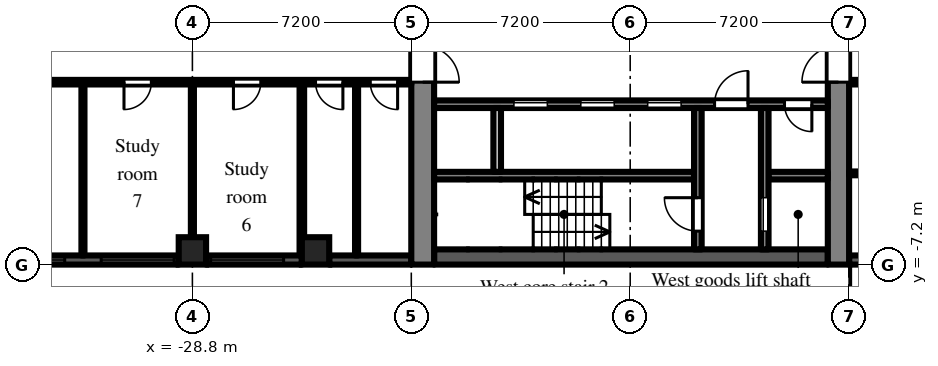
"""IFC4 building model, lengths in metres.
Left out: names, types, materials, properties, quantities, classifications, styles, units other than length and angle.
Written with IfcOpenShell. Run it as: python <this file> out.ifc"""

import sys

from ifc_helpers import new_model, si_unit, direction, frame, frame_2d, origin, origin_2d, place, context, subcontext, project, spatial, rectangle, extrude, element, fill, save


model = new_model("IFC4")
c1 = context("Model", 3, precision=1e-05, world=origin(), true_north=direction((0.0, 1.0)))
c2 = subcontext(c1, "Body", "Model", "MODEL_VIEW")
j1 = project(units=[si_unit("LENGTHUNIT", "METRE"), si_unit("PLANEANGLEUNIT", "RADIAN")], contexts=[c1])
p1 = place(None, origin())
s1 = spatial("IfcSite", under=j1, at=p1, CompositionType="ELEMENT")
p2 = place(p1, origin())
s2 = spatial("IfcBuilding", under=s1, at=p2, CompositionType="ELEMENT")
p3 = place(p2, frame((0.0, 0.0, 20.7)))
s3 = spatial("IfcBuildingStorey", under=s2, at=p3, CompositionType="ELEMENT", Elevation=20.7)
for number, where, z_axis, x_axis in (
    (1, (-28.8, -6.75, 0.0), (0.0, 0.0, 1.0), (1.0, 0.0, 0.0)),
    (2, (-24.75, -6.75, 0.0), (0.0, 0.0, 1.0), (1.0, 0.0, 0.0)),
):
    element("IfcColumn", number, at=place(p3, frame(where, z_axis=z_axis, x_axis=x_axis)), inside=s3, PredefinedType="COLUMN", context=c2, shape_type="SweptSolid", body=[
        extrude(rectangle(XDim=0.9, YDim=0.9, at=origin_2d()), origin(), (0.0, 0.0, 1.0), 3.0),
    ])
p4 = place(p3, frame((-35.55, -7.05, 0.0), z_axis=(0.0, 0.0, 1.0), x_axis=(1.0, 0.0, 0.0)))
e3 = element("IfcWall", 3, at=p4, inside=s3, PredefinedType="SOLIDWALL", context=c2, shape_type="SweptSolid", body=[
    extrude(rectangle(XDim=6.3, YDim=0.3, at=frame_2d((3.15, 0.0))), origin(), (0.0, 0.0, 1.0), 2.1),
])
p5 = place(p4, frame((0.15, 0.0, 0.2)))
e4 = element("IfcOpeningElement", 4, at=p5, cuts=e3, PredefinedType="OPENING", context=c2, shape_type="SweptSolid", body=[
    extrude(rectangle(XDim=2.4, YDim=1.85, at=frame_2d((1.2, 0.925))), frame((0.0, 0.16, 0.0), z_axis=(0.0, -1.0, 0.0), x_axis=(1.0, 0.0, 0.0)), (0.0, 0.0, 1.0), 0.32),
])
p6 = place(p4, frame((3.75, 0.0, 0.2)))
e5 = element("IfcOpeningElement", 5, at=p6, cuts=e3, PredefinedType="OPENING", context=c2, shape_type="SweptSolid", body=[
    extrude(rectangle(XDim=2.4, YDim=1.85, at=frame_2d((1.2, 0.925))), frame((0.0, 0.16, 0.0), z_axis=(0.0, -1.0, 0.0), x_axis=(1.0, 0.0, 0.0)), (0.0, 0.0, 1.0), 0.32),
])
p7 = place(p3, frame((-28.35, -7.05, 0.0), z_axis=(0.0, 0.0, 1.0), x_axis=(1.0, 0.0, 0.0)))
e6 = element("IfcWall", 6, at=p7, inside=s3, PredefinedType="SOLIDWALL", context=c2, shape_type="SweptSolid", body=[
    extrude(rectangle(XDim=3.15, YDim=0.3, at=frame_2d((1.575, 0.0))), origin(), (0.0, 0.0, 1.0), 2.1),
])
p8 = place(p7, frame((0.15, 0.0, 0.2)))
e7 = element("IfcOpeningElement", 7, at=p8, cuts=e6, PredefinedType="OPENING", context=c2, shape_type="SweptSolid", body=[
    extrude(rectangle(XDim=2.4, YDim=1.85, at=frame_2d((1.2, 0.925))), frame((0.0, 0.16, 0.0), z_axis=(0.0, -1.0, 0.0), x_axis=(1.0, 0.0, 0.0)), (0.0, 0.0, 1.0), 0.32),
])
p9 = place(p3, frame((-24.3, -7.05, 0.0), z_axis=(0.0, 0.0, 1.0), x_axis=(1.0, 0.0, 0.0)))
e8 = element("IfcWall", 8, at=p9, inside=s3, PredefinedType="SOLIDWALL", context=c2, shape_type="SweptSolid", body=[
    extrude(rectangle(XDim=2.7, YDim=0.3, at=frame_2d((1.35, 0.0))), origin(), (0.0, 0.0, 1.0), 2.1),
])
p10 = place(p3, frame((-7.2, -7.05, 0.0), z_axis=(0.0, 0.0, 1.0), x_axis=(1.0, 0.0, 0.0)))
e9 = element("IfcWall", 9, at=p10, inside=s3, PredefinedType="SOLIDWALL", context=c2, shape_type="SweptSolid", body=[
    extrude(rectangle(XDim=3.0, YDim=0.3, at=frame_2d((1.5, 0.0))), origin(), (0.0, 0.0, 1.0), 2.1),
])
p11 = place(p3, frame((-7.55, -7.2, 0.0), z_axis=(0.0, 0.0, 1.0), x_axis=(0.0, 1.0, 0.0)))
e10 = element("IfcWall", 10, at=p11, inside=s3, PredefinedType="SHEAR", context=c2, shape_type="SweptSolid", body=[
    extrude(rectangle(XDim=14.4, YDim=0.7, at=frame_2d((7.2, 0.0))), origin(), (0.0, 0.0, 1.0), 2.575),
])
p12 = place(p11, frame((6.0, 0.0, 0.0)))
e11 = element("IfcOpeningElement", 11, at=p12, cuts=e10, PredefinedType="OPENING", context=c2, shape_type="SweptSolid", body=[
    extrude(rectangle(XDim=2.4, YDim=2.2, at=frame_2d((1.2, 1.1))), frame((0.0, 0.36, 0.0), z_axis=(0.0, -1.0, 0.0), x_axis=(1.0, 0.0, 0.0)), (0.0, 0.0, 1.0), 0.72),
])
p13 = place(p3, frame((-21.225, -7.2, 0.0), z_axis=(0.0, 0.0, 1.0), x_axis=(0.0, 1.0, 0.0)))
e12 = element("IfcWall", 12, at=p13, inside=s3, PredefinedType="SHEAR", context=c2, shape_type="SweptSolid", body=[
    extrude(rectangle(XDim=14.4, YDim=0.75, at=frame_2d((7.2, 0.0))), origin(), (0.0, 0.0, 1.0), 2.575),
])
p14 = place(p13, frame((6.0, 0.0, 0.0)))
e13 = element("IfcOpeningElement", 13, at=p14, cuts=e12, PredefinedType="OPENING", context=c2, shape_type="SweptSolid", body=[
    extrude(rectangle(XDim=2.4, YDim=2.2, at=frame_2d((1.2, 1.1))), frame((0.0, 0.385, 0.0), z_axis=(0.0, -1.0, 0.0), x_axis=(1.0, 0.0, 0.0)), (0.0, 0.0, 1.0), 0.77),
])
p15 = place(p3, frame((-7.9, -6.95, 0.0), z_axis=(0.0, 0.0, 1.0), x_axis=(-1.0, 0.0, 0.0)))
e14 = element("IfcWall", 14, at=p15, inside=s3, PredefinedType="SHEAR", context=c2, shape_type="SweptSolid", body=[
    extrude(rectangle(XDim=12.95, YDim=0.5, at=frame_2d((6.475, 0.0))), origin(), (0.0, 0.0, 1.0), 2.575),
])
p16 = place(p3, frame((-7.9, -1.925, 0.0), z_axis=(0.0, 0.0, 1.0), x_axis=(-1.0, 0.0, 0.0)))
e15 = element("IfcWall", 15, at=p16, inside=s3, PredefinedType="SHEAR", context=c2, shape_type="SweptSolid", body=[
    extrude(rectangle(XDim=12.95, YDim=0.25, at=frame_2d((6.475, 0.0))), origin(), (0.0, 0.0, 1.0), 2.575),
])
p17 = place(p16, frame((4.825, 0.0, 0.0)))
e16 = element("IfcOpeningElement", 16, at=p17, cuts=e15, PredefinedType="OPENING", context=c2, shape_type="SweptSolid", body=[
    extrude(rectangle(XDim=1.1, YDim=2.1, at=frame_2d((0.55, 1.05))), frame((0.0, 0.135, 0.0), z_axis=(0.0, -1.0, 0.0), x_axis=(1.0, 0.0, 0.0)), (0.0, 0.0, 1.0), 0.27),
])
p18 = place(p16, frame((7.025, 0.0, 0.0)))
e17 = element("IfcOpeningElement", 17, at=p18, cuts=e15, PredefinedType="OPENING", context=c2, shape_type="SweptSolid", body=[
    extrude(rectangle(XDim=1.1, YDim=2.1, at=frame_2d((0.55, 1.05))), frame((0.0, 0.135, 0.0), z_axis=(0.0, -1.0, 0.0), x_axis=(1.0, 0.0, 0.0)), (0.0, 0.0, 1.0), 0.27),
])
p19 = place(p16, frame((9.225, 0.0, 0.0)))
e18 = element("IfcOpeningElement", 18, at=p19, cuts=e15, PredefinedType="OPENING", context=c2, shape_type="SweptSolid", body=[
    extrude(rectangle(XDim=1.1, YDim=2.1, at=frame_2d((0.55, 1.05))), frame((0.0, 0.135, 0.0), z_axis=(0.0, -1.0, 0.0), x_axis=(1.0, 0.0, 0.0)), (0.0, 0.0, 1.0), 0.27),
])
p20 = place(p16, frame((0.525, 0.0, 0.0)))
e19 = element("IfcOpeningElement", 19, at=p20, cuts=e15, PredefinedType="OPENING", context=c2, shape_type="SweptSolid", body=[
    extrude(rectangle(XDim=0.9, YDim=2.1, at=frame_2d((0.45, 1.05))), frame((0.0, 0.135, 0.0), z_axis=(0.0, -1.0, 0.0), x_axis=(1.0, 0.0, 0.0)), (0.0, 0.0, 1.0), 0.27),
])
p21 = place(p16, frame((2.625, 0.0, 0.0)))
e20 = element("IfcOpeningElement", 20, at=p21, cuts=e15, PredefinedType="OPENING", context=c2, shape_type="SweptSolid", body=[
    extrude(rectangle(XDim=1.1, YDim=2.1, at=frame_2d((0.55, 1.05))), frame((0.0, 0.135, 0.0), z_axis=(0.0, -1.0, 0.0), x_axis=(1.0, 0.0, 0.0)), (0.0, 0.0, 1.0), 0.27),
])
p22 = place(p3, frame((-7.9, -4.275, 0.0), z_axis=(0.0, 0.0, 1.0), x_axis=(-1.0, 0.0, 0.0)))
e21 = element("IfcWall", 21, at=p22, inside=s3, PredefinedType="SHEAR", context=c2, shape_type="SweptSolid", body=[
    extrude(rectangle(XDim=1.95, YDim=0.25, at=frame_2d((0.975, 0.0))), origin(), (0.0, 0.0, 1.0), 2.575),
])
p23 = place(p3, frame((-12.3, -4.275, 0.0), z_axis=(0.0, 0.0, 1.0), x_axis=(-1.0, 0.0, 0.0)))
e22 = element("IfcWall", 22, at=p23, inside=s3, PredefinedType="SHEAR", context=c2, shape_type="SweptSolid", body=[
    extrude(rectangle(XDim=8.55, YDim=0.25, at=frame_2d((4.275, 0.0))), origin(), (0.0, 0.0, 1.0), 2.575),
])
p24 = place(p3, frame((-9.975, -2.05, 0.0), z_axis=(0.0, 0.0, 1.0), x_axis=(0.0, -1.0, 0.0)))
e23 = element("IfcWall", 23, at=p24, inside=s3, PredefinedType="SHEAR", context=c2, shape_type="SweptSolid", body=[
    extrude(rectangle(XDim=4.65, YDim=0.25, at=frame_2d((2.325, 0.0))), origin(), (0.0, 0.0, 1.0), 2.575),
])
p25 = place(p24, frame((2.95, 0.0, 0.0)))
e24 = element("IfcOpeningElement", 24, at=p25, cuts=e23, PredefinedType="OPENING", context=c2, shape_type="SweptSolid", body=[
    extrude(rectangle(XDim=1.1, YDim=2.1, at=frame_2d((0.55, 1.05))), frame((0.0, 0.135, 0.0), z_axis=(0.0, -1.0, 0.0), x_axis=(1.0, 0.0, 0.0)), (0.0, 0.0, 1.0), 0.27),
])
p26 = place(p3, frame((-12.175, -2.05, 0.0), z_axis=(0.0, 0.0, 1.0), x_axis=(0.0, -1.0, 0.0)))
e25 = element("IfcWall", 25, at=p26, inside=s3, PredefinedType="SHEAR", context=c2, shape_type="SweptSolid", body=[
    extrude(rectangle(XDim=4.65, YDim=0.25, at=frame_2d((2.325, 0.0))), origin(), (0.0, 0.0, 1.0), 2.575),
])
p27 = place(p26, frame((2.95, 0.0, 0.0)))
e26 = element("IfcOpeningElement", 26, at=p27, cuts=e25, PredefinedType="OPENING", context=c2, shape_type="SweptSolid", body=[
    extrude(rectangle(XDim=1.1, YDim=2.1, at=frame_2d((0.55, 1.05))), frame((0.0, 0.135, 0.0), z_axis=(0.0, -1.0, 0.0), x_axis=(1.0, 0.0, 0.0)), (0.0, 0.0, 1.0), 0.27),
])
p28 = place(p3, frame((-18.775, -2.05, 0.0), z_axis=(0.0, 0.0, 1.0), x_axis=(0.0, -1.0, 0.0)))
e27 = element("IfcWall", 27, at=p28, inside=s3, PredefinedType="PARTITIONING", context=c2, shape_type="SweptSolid", body=[
    extrude(rectangle(XDim=2.1, YDim=0.25, at=frame_2d((1.05, 0.0))), origin(), (0.0, 0.0, 1.0), 2.575),
])
p29 = place(p3, frame((-36.5, -1.2, 0.0), z_axis=(0.0, 0.0, 1.0), x_axis=(1.0, 0.0, 0.0)))
e28 = element("IfcWall", 28, at=p29, inside=s3, PredefinedType="PARTITIONING", context=c2, shape_type="SweptSolid", body=[
    extrude(rectangle(XDim=14.9, YDim=0.15, at=frame_2d((7.45, 0.0))), origin(), (0.0, 0.0, 1.0), 2.575),
])
p30 = place(p29, frame((13.55, 0.0, 0.0)))
e29 = element("IfcOpeningElement", 29, at=p30, cuts=e28, PredefinedType="OPENING", context=c2, shape_type="SweptSolid", body=[
    extrude(rectangle(XDim=0.9, YDim=2.1, at=frame_2d((0.45, 1.05))), frame((0.0, 0.085, 0.0), z_axis=(0.0, -1.0, 0.0), x_axis=(1.0, 0.0, 0.0)), (0.0, 0.0, 1.0), 0.17),
])
p31 = place(p29, frame((11.75, 0.0, 0.0)))
e30 = element("IfcOpeningElement", 30, at=p31, cuts=e28, PredefinedType="OPENING", context=c2, shape_type="SweptSolid", body=[
    extrude(rectangle(XDim=0.9, YDim=2.1, at=frame_2d((0.45, 1.05))), frame((0.0, 0.085, 0.0), z_axis=(0.0, -1.0, 0.0), x_axis=(1.0, 0.0, 0.0)), (0.0, 0.0, 1.0), 0.17),
])
p32 = place(p29, frame((9.05, 0.0, 0.0)))
e31 = element("IfcOpeningElement", 31, at=p32, cuts=e28, PredefinedType="OPENING", context=c2, shape_type="SweptSolid", body=[
    extrude(rectangle(XDim=0.9, YDim=2.1, at=frame_2d((0.45, 1.05))), frame((0.0, 0.085, 0.0), z_axis=(0.0, -1.0, 0.0), x_axis=(1.0, 0.0, 0.0)), (0.0, 0.0, 1.0), 0.17),
])
p33 = place(p29, frame((5.45, 0.0, 0.0)))
e32 = element("IfcOpeningElement", 32, at=p33, cuts=e28, PredefinedType="OPENING", context=c2, shape_type="SweptSolid", body=[
    extrude(rectangle(XDim=0.9, YDim=2.1, at=frame_2d((0.45, 1.05))), frame((0.0, 0.085, 0.0), z_axis=(0.0, -1.0, 0.0), x_axis=(1.0, 0.0, 0.0)), (0.0, 0.0, 1.0), 0.17),
])
p34 = place(p29, frame((1.15, 0.0, 0.0)))
e33 = element("IfcOpeningElement", 33, at=p34, cuts=e28, PredefinedType="OPENING", context=c2, shape_type="SweptSolid", body=[
    extrude(rectangle(XDim=1.8, YDim=2.1, at=frame_2d((0.9, 1.05))), frame((0.0, 0.085, 0.0), z_axis=(0.0, -1.0, 0.0), x_axis=(1.0, 0.0, 0.0)), (0.0, 0.0, 1.0), 0.17),
])
for number, where, z_axis, x_axis in (
    (34, (-32.4, -6.9, 0.0), (0.0, 0.0, 1.0), (0.0, 1.0, 0.0)),
    (35, (-28.8, -6.9, 0.0), (0.0, 0.0, 1.0), (0.0, 1.0, 0.0)),
):
    element("IfcWall", number, at=place(p3, frame(where, z_axis=z_axis, x_axis=x_axis)), inside=s3, PredefinedType="PARTITIONING", context=c2, shape_type="SweptSolid", body=[
        extrude(rectangle(XDim=5.625, YDim=0.1, at=frame_2d((2.812, 0.0))), origin(), (0.0, 0.0, 1.0), 2.575),
    ])
p35 = place(p3, frame((-25.2, -6.9, 0.0), z_axis=(0.0, 0.0, 1.0), x_axis=(0.0, 1.0, 0.0)))
e36 = element("IfcWall", 36, at=p35, inside=s3, PredefinedType="PARTITIONING", context=c2, shape_type="SweptSolid", body=[
    extrude(rectangle(XDim=5.625, YDim=0.15, at=frame_2d((2.812, 0.0))), origin(), (0.0, 0.0, 1.0), 2.575),
])
p36 = place(p3, frame((-23.4, -6.9, 0.0), z_axis=(0.0, 0.0, 1.0), x_axis=(0.0, 1.0, 0.0)))
e37 = element("IfcWall", 37, at=p36, inside=s3, PredefinedType="PARTITIONING", context=c2, shape_type="SweptSolid", body=[
    extrude(rectangle(XDim=5.625, YDim=0.1, at=frame_2d((2.812, 0.0))), origin(), (0.0, 0.0, 1.0), 2.575),
])
p37 = place(p3, frame((-7.2, -4.2, 0.0), z_axis=(0.0, 0.0, 1.0), x_axis=(1.0, 0.0, 0.0)))
e38 = element("IfcWall", 38, at=p37, inside=s3, PredefinedType="PARTITIONING", context=c2, shape_type="SweptSolid", body=[
    extrude(rectangle(XDim=5.925, YDim=0.125, at=frame_2d((2.962, 0.0))), origin(), (0.0, 0.0, 1.0), 2.575),
])
p38 = place(p3, frame((-7.2, -1.2, 0.0), z_axis=(0.0, 0.0, 1.0), x_axis=(1.0, 0.0, 0.0)))
e39 = element("IfcWall", 39, at=p38, inside=s3, PredefinedType="PARTITIONING", context=c2, shape_type="SweptSolid", body=[
    extrude(rectangle(XDim=6.075, YDim=0.15, at=frame_2d((3.038, 0.0))), origin(), (0.0, 0.0, 1.0), 2.575),
])
p39 = place(p38, frame((2.55, 0.0, 0.0)))
e40 = element("IfcOpeningElement", 40, at=p39, cuts=e39, PredefinedType="OPENING", context=c2, shape_type="SweptSolid", body=[
    extrude(rectangle(XDim=0.9, YDim=2.1, at=frame_2d((0.45, 1.05))), frame((0.0, 0.085, 0.0), z_axis=(0.0, -1.0, 0.0), x_axis=(1.0, 0.0, 0.0)), (0.0, 0.0, 1.0), 0.17),
])
p40 = place(p5, origin())
e41 = element("IfcWindow", 41, at=p40, inside=s3, PartitioningType="SINGLE_PANEL", PredefinedType="WINDOW", context=c2, shape_type="SweptSolid", body=[
    extrude(rectangle(XDim=2.4, YDim=1.85, at=frame_2d((1.2, 0.925))), frame((0.0, 0.03, 0.0), z_axis=(0.0, -1.0, 0.0), x_axis=(1.0, 0.0, 0.0)), (0.0, 0.0, 1.0), 0.06),
])
fill(e4, e41)
p41 = place(p6, origin())
e42 = element("IfcWindow", 42, at=p41, inside=s3, PartitioningType="SINGLE_PANEL", PredefinedType="WINDOW", context=c2, shape_type="SweptSolid", body=[
    extrude(rectangle(XDim=2.4, YDim=1.85, at=frame_2d((1.2, 0.925))), frame((0.0, 0.03, 0.0), z_axis=(0.0, -1.0, 0.0), x_axis=(1.0, 0.0, 0.0)), (0.0, 0.0, 1.0), 0.06),
])
fill(e5, e42)
p42 = place(p8, origin())
e43 = element("IfcWindow", 43, at=p42, inside=s3, PartitioningType="SINGLE_PANEL", PredefinedType="WINDOW", context=c2, shape_type="SweptSolid", body=[
    extrude(rectangle(XDim=2.4, YDim=1.85, at=frame_2d((1.2, 0.925))), frame((0.0, 0.03, 0.0), z_axis=(0.0, -1.0, 0.0), x_axis=(1.0, 0.0, 0.0)), (0.0, 0.0, 1.0), 0.06),
])
fill(e7, e43)
p43 = place(p17, origin())
e44 = element("IfcDoor", 44, at=p43, inside=s3, OperationType="SLIDING_TO_LEFT", PredefinedType="DOOR", context=c2, shape_type="SweptSolid", body=[
    extrude(rectangle(XDim=1.1, YDim=2.1, at=frame_2d((0.55, 1.05))), frame((0.0, 0.025, 0.0), z_axis=(0.0, -1.0, 0.0), x_axis=(1.0, 0.0, 0.0)), (0.0, 0.0, 1.0), 0.05),
])
fill(e16, e44)
p44 = place(p18, origin())
e45 = element("IfcDoor", 45, at=p44, inside=s3, OperationType="SLIDING_TO_LEFT", PredefinedType="DOOR", context=c2, shape_type="SweptSolid", body=[
    extrude(rectangle(XDim=1.1, YDim=2.1, at=frame_2d((0.55, 1.05))), frame((0.0, 0.025, 0.0), z_axis=(0.0, -1.0, 0.0), x_axis=(1.0, 0.0, 0.0)), (0.0, 0.0, 1.0), 0.05),
])
fill(e17, e45)
p45 = place(p19, origin())
e46 = element("IfcDoor", 46, at=p45, inside=s3, OperationType="SLIDING_TO_LEFT", PredefinedType="DOOR", context=c2, shape_type="SweptSolid", body=[
    extrude(rectangle(XDim=1.1, YDim=2.1, at=frame_2d((0.55, 1.05))), frame((0.0, 0.025, 0.0), z_axis=(0.0, -1.0, 0.0), x_axis=(1.0, 0.0, 0.0)), (0.0, 0.0, 1.0), 0.05),
])
fill(e18, e46)
p46 = place(p25, origin())
e47 = element("IfcDoor", 47, at=p46, inside=s3, OperationType="SLIDING_TO_LEFT", PredefinedType="DOOR", context=c2, shape_type="SweptSolid", body=[
    extrude(rectangle(XDim=1.1, YDim=2.1, at=frame_2d((0.55, 1.05))), frame((0.0, 0.025, 0.0), z_axis=(0.0, -1.0, 0.0), x_axis=(1.0, 0.0, 0.0)), (0.0, 0.0, 1.0), 0.05),
])
fill(e24, e47)
p47 = place(p27, frame((1.1, 0.0, 0.0), z_axis=(0.0, 0.0, 1.0), x_axis=(-1.0, 0.0, 0.0)))
e48 = element("IfcDoor", 48, at=p47, inside=s3, OperationType="SINGLE_SWING_RIGHT", PredefinedType="DOOR", context=c2, shape_type="SweptSolid", body=[
    extrude(rectangle(XDim=1.1, YDim=2.1, at=frame_2d((0.55, 1.05))), frame((0.0, 0.025, 0.0), z_axis=(0.0, -1.0, 0.0), x_axis=(1.0, 0.0, 0.0)), (0.0, 0.0, 1.0), 0.05),
])
fill(e26, e48)
p48 = place(p20, origin())
e49 = element("IfcDoor", 49, at=p48, inside=s3, OperationType="SINGLE_SWING_LEFT", PredefinedType="DOOR", context=c2, shape_type="SweptSolid", body=[
    extrude(rectangle(XDim=0.9, YDim=2.1, at=frame_2d((0.45, 1.05))), frame((0.0, 0.025, 0.0), z_axis=(0.0, -1.0, 0.0), x_axis=(1.0, 0.0, 0.0)), (0.0, 0.0, 1.0), 0.05),
])
fill(e19, e49)
p49 = place(p21, frame((1.1, 0.0, 0.0), z_axis=(0.0, 0.0, 1.0), x_axis=(-1.0, 0.0, 0.0)))
e50 = element("IfcDoor", 50, at=p49, inside=s3, OperationType="SINGLE_SWING_RIGHT", PredefinedType="DOOR", context=c2, shape_type="SweptSolid", body=[
    extrude(rectangle(XDim=1.1, YDim=2.1, at=frame_2d((0.55, 1.05))), frame((0.0, 0.025, 0.0), z_axis=(0.0, -1.0, 0.0), x_axis=(1.0, 0.0, 0.0)), (0.0, 0.0, 1.0), 0.05),
])
fill(e20, e50)
p50 = place(p12, origin())
e51 = element("IfcDoor", 51, at=p50, inside=s3, OperationType="DOUBLE_DOOR_DOUBLE_SWING", PredefinedType="DOOR", context=c2, shape_type="SweptSolid", body=[
    extrude(rectangle(XDim=2.4, YDim=2.2, at=frame_2d((1.2, 1.1))), frame((0.0, 0.025, 0.0), z_axis=(0.0, -1.0, 0.0), x_axis=(1.0, 0.0, 0.0)), (0.0, 0.0, 1.0), 0.05),
])
fill(e11, e51)
p51 = place(p14, frame((2.4, 0.0, 0.0), z_axis=(0.0, 0.0, 1.0), x_axis=(-1.0, 0.0, 0.0)))
e52 = element("IfcDoor", 52, at=p51, inside=s3, OperationType="DOUBLE_DOOR_DOUBLE_SWING", PredefinedType="DOOR", context=c2, shape_type="SweptSolid", body=[
    extrude(rectangle(XDim=2.4, YDim=2.2, at=frame_2d((1.2, 1.1))), frame((0.0, 0.025, 0.0), z_axis=(0.0, -1.0, 0.0), x_axis=(1.0, 0.0, 0.0)), (0.0, 0.0, 1.0), 0.05),
])
fill(e13, e52)
p52 = place(p30, frame((0.9, 0.0, 0.0), z_axis=(0.0, 0.0, 1.0), x_axis=(-1.0, 0.0, 0.0)))
e53 = element("IfcDoor", 53, at=p52, inside=s3, OperationType="SINGLE_SWING_LEFT", PredefinedType="DOOR", context=c2, shape_type="SweptSolid", body=[
    extrude(rectangle(XDim=0.9, YDim=2.1, at=frame_2d((0.45, 1.05))), frame((0.0, 0.025, 0.0), z_axis=(0.0, -1.0, 0.0), x_axis=(1.0, 0.0, 0.0)), (0.0, 0.0, 1.0), 0.05),
])
fill(e29, e53)
p53 = place(p31, frame((0.9, 0.0, 0.0), z_axis=(0.0, 0.0, 1.0), x_axis=(-1.0, 0.0, 0.0)))
e54 = element("IfcDoor", 54, at=p53, inside=s3, OperationType="SINGLE_SWING_LEFT", PredefinedType="DOOR", context=c2, shape_type="SweptSolid", body=[
    extrude(rectangle(XDim=0.9, YDim=2.1, at=frame_2d((0.45, 1.05))), frame((0.0, 0.025, 0.0), z_axis=(0.0, -1.0, 0.0), x_axis=(1.0, 0.0, 0.0)), (0.0, 0.0, 1.0), 0.05),
])
fill(e30, e54)
p54 = place(p32, frame((0.9, 0.0, 0.0), z_axis=(0.0, 0.0, 1.0), x_axis=(-1.0, 0.0, 0.0)))
e55 = element("IfcDoor", 55, at=p54, inside=s3, OperationType="SINGLE_SWING_RIGHT", PredefinedType="DOOR", context=c2, shape_type="SweptSolid", body=[
    extrude(rectangle(XDim=0.9, YDim=2.1, at=frame_2d((0.45, 1.05))), frame((0.0, 0.025, 0.0), z_axis=(0.0, -1.0, 0.0), x_axis=(1.0, 0.0, 0.0)), (0.0, 0.0, 1.0), 0.05),
])
fill(e31, e55)
p55 = place(p33, frame((0.9, 0.0, 0.0), z_axis=(0.0, 0.0, 1.0), x_axis=(-1.0, 0.0, 0.0)))
e56 = element("IfcDoor", 56, at=p55, inside=s3, OperationType="SINGLE_SWING_RIGHT", PredefinedType="DOOR", context=c2, shape_type="SweptSolid", body=[
    extrude(rectangle(XDim=0.9, YDim=2.1, at=frame_2d((0.45, 1.05))), frame((0.0, 0.025, 0.0), z_axis=(0.0, -1.0, 0.0), x_axis=(1.0, 0.0, 0.0)), (0.0, 0.0, 1.0), 0.05),
])
fill(e32, e56)
save(model, sys.argv[1])
